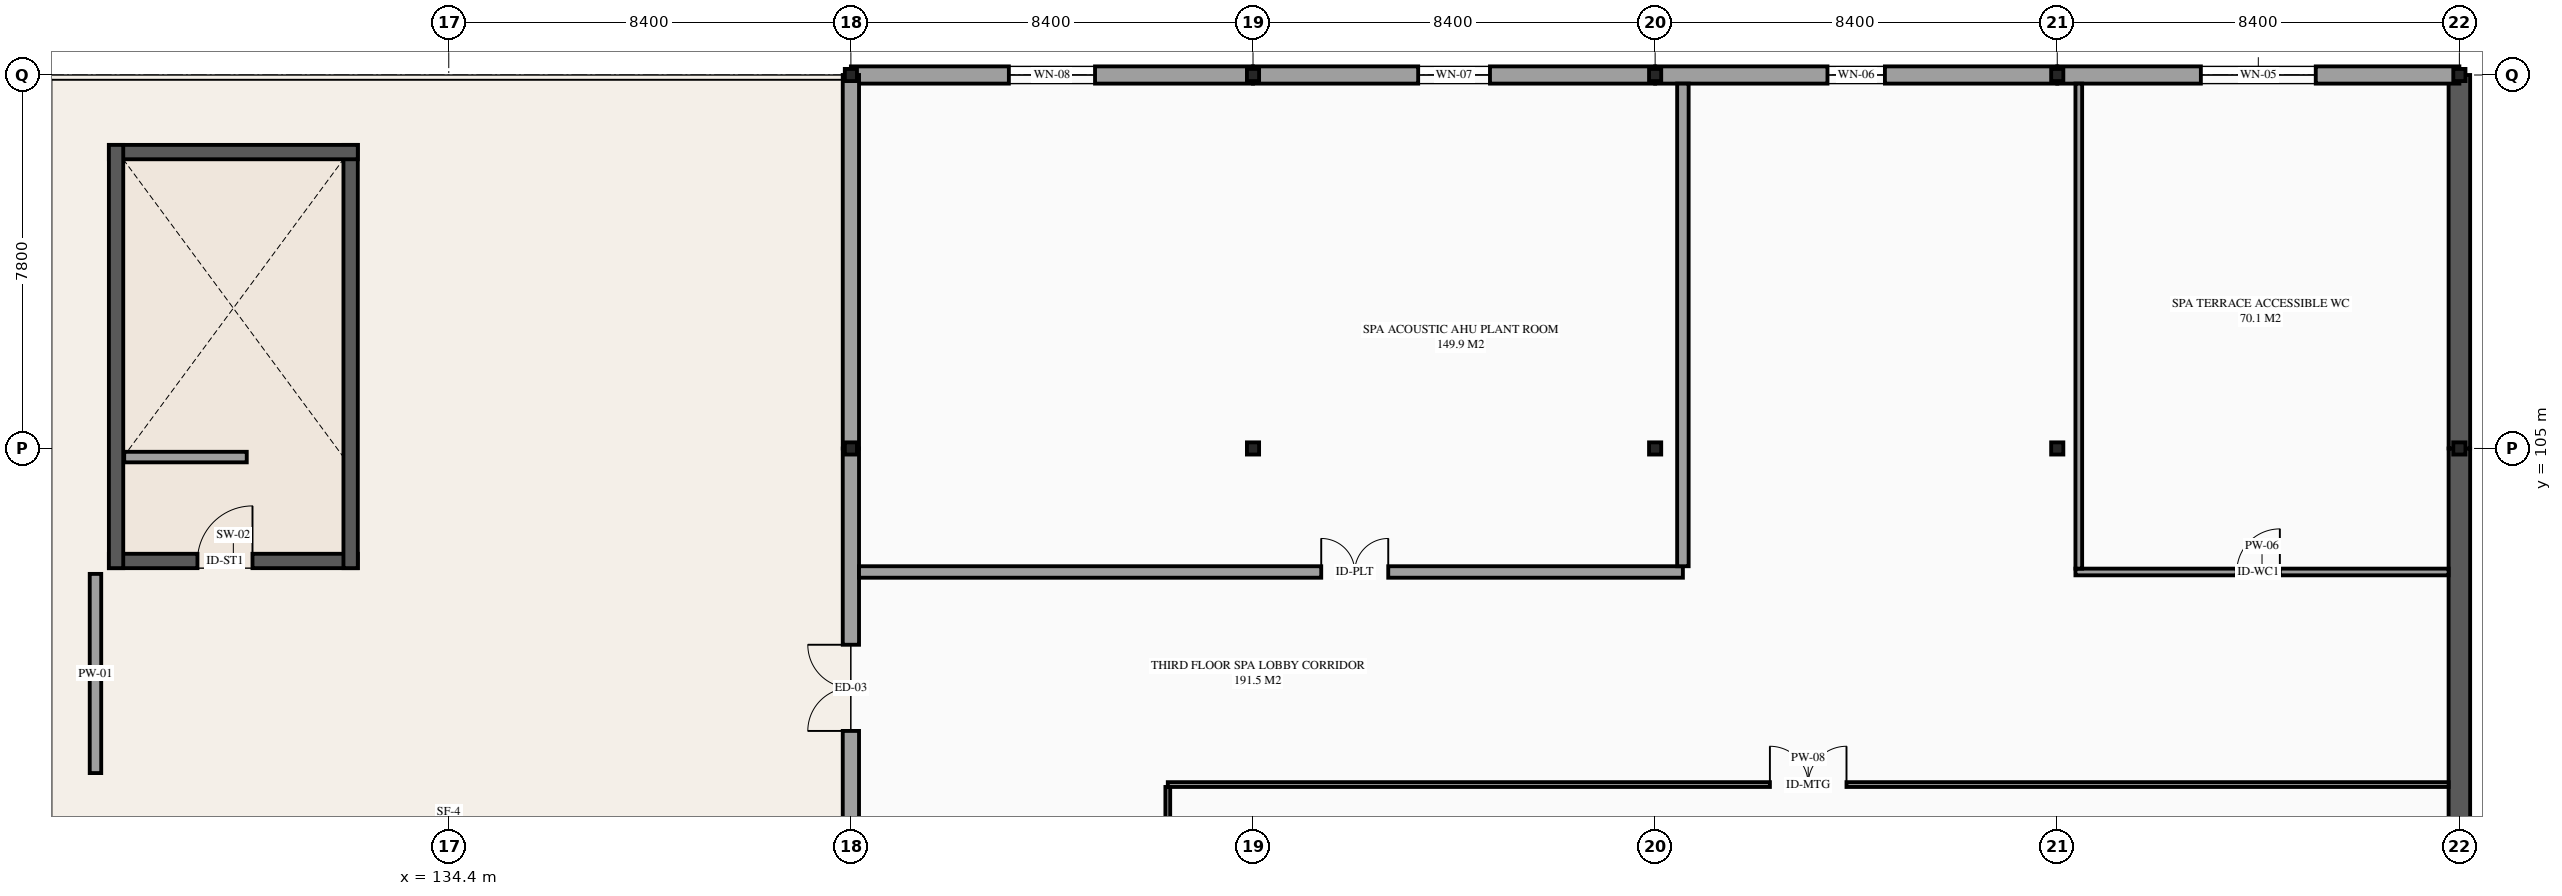
"""IFC4 building model, lengths in metres.
Left out: names, types, materials, properties, quantities, classifications, styles, units other than length and angle.
Written with IfcOpenShell. Run it as: python <this file> out.ifc"""

import sys

from ifc_helpers import new_model, si_unit, direction, frame, frame_2d, origin, origin_2d, place, context, subcontext, project, spatial, rectangle, hollow_rectangle, extrude, element, fill, save


model = new_model("IFC4")
c1 = context("Model", 3, precision=1e-05, world=origin(), true_north=direction((0.0, 1.0)))
c2 = subcontext(c1, "Body", "Model", "MODEL_VIEW")
j1 = project(units=[si_unit("LENGTHUNIT", "METRE"), si_unit("PLANEANGLEUNIT", "RADIAN")], contexts=[c1])
p1 = place(None, origin())
s1 = spatial("IfcSite", under=j1, at=p1, CompositionType="ELEMENT")
p2 = place(p1, origin())
s2 = spatial("IfcBuilding", under=s1, at=p2, CompositionType="ELEMENT")
p3 = place(p2, frame((0.0, 0.0, 14.1)))
s3 = spatial("IfcBuildingStorey", under=s2, at=p3, CompositionType="ELEMENT", Elevation=14.1)
for number, where, z_axis, x_axis in (
    (1, (142.8, 105.0, 0.0), (0.0, 0.0, 1.0), (1.0, 0.0, 0.0)),
    (2, (142.8, 112.8, 0.0), (0.0, 0.0, 1.0), (1.0, 0.0, 0.0)),
    (3, (151.2, 105.0, 0.0), (0.0, 0.0, 1.0), (1.0, 0.0, 0.0)),
    (4, (151.2, 112.8, 0.0), (0.0, 0.0, 1.0), (1.0, 0.0, 0.0)),
    (5, (159.6, 105.0, 0.0), (0.0, 0.0, 1.0), (1.0, 0.0, 0.0)),
    (6, (159.6, 112.8, 0.0), (0.0, 0.0, 1.0), (1.0, 0.0, 0.0)),
    (7, (168.0, 105.0, 0.0), (0.0, 0.0, 1.0), (1.0, 0.0, 0.0)),
    (8, (168.0, 112.8, 0.0), (0.0, 0.0, 1.0), (1.0, 0.0, 0.0)),
    (9, (176.4, 105.0, 0.0), (0.0, 0.0, 1.0), (1.0, 0.0, 0.0)),
    (10, (176.4, 112.8, 0.0), (0.0, 0.0, 1.0), (1.0, 0.0, 0.0)),
):
    element("IfcColumn", number, at=place(p3, frame(where, z_axis=z_axis, x_axis=x_axis)), inside=s3, PredefinedType="COLUMN", context=c2, shape_type="SweptSolid", body=[
        extrude(hollow_rectangle(XDim=0.254, YDim=0.254, WallThickness=0.012, InnerFilletRadius=0.012, OuterFilletRadius=0.024, at=origin_2d()), origin(), (0.0, 0.0, 1.0), 4.2),
    ])
p4 = place(p3, frame((176.4, 96.6, 0.0), z_axis=(0.0, 0.0, 1.0), x_axis=(0.0, 1.0, 0.0)))
e11 = element("IfcWall", 11, at=p4, inside=s3, PredefinedType="STANDARD", context=c2, shape_type="SweptSolid", body=[
    extrude(rectangle(XDim=8.4, YDim=0.45, at=frame_2d((4.2, 0.0))), origin(), (0.0, 0.0, 1.0), 4.2),
])
p5 = place(p3, frame((176.4, 105.0, 0.0), z_axis=(0.0, 0.0, 1.0), x_axis=(0.0, 1.0, 0.0)))
e12 = element("IfcWall", 12, at=p5, inside=s3, PredefinedType="STANDARD", context=c2, shape_type="SweptSolid", body=[
    extrude(rectangle(XDim=7.8, YDim=0.45, at=frame_2d((3.9, 0.0))), origin(), (0.0, 0.0, 1.0), 4.2),
])
p6 = place(p3, frame((176.4, 112.8, 0.0), z_axis=(0.0, 0.0, 1.0), x_axis=(-1.0, 0.0, 0.0)))
e13 = element("IfcWall", 13, at=p6, inside=s3, PredefinedType="STANDARD", context=c2, shape_type="SweptSolid", body=[
    extrude(rectangle(XDim=8.4, YDim=0.36, at=frame_2d((4.2, 0.0))), origin(), (0.0, 0.0, 1.0), 3.05),
])
p7 = place(p6, frame((3.0, 0.0, 0.8)))
e14 = element("IfcOpeningElement", 14, at=p7, cuts=e13, PredefinedType="OPENING", context=c2, shape_type="SweptSolid", body=[
    extrude(rectangle(XDim=2.4, YDim=1.5, at=frame_2d((1.2, 0.75))), frame((0.0, 0.19, 0.0), z_axis=(0.0, -1.0, 0.0), x_axis=(1.0, 0.0, 0.0)), (0.0, 0.0, 1.0), 0.38),
])
p8 = place(p3, frame((168.0, 112.8, 0.0), z_axis=(0.0, 0.0, 1.0), x_axis=(-1.0, 0.0, 0.0)))
e15 = element("IfcWall", 15, at=p8, inside=s3, PredefinedType="STANDARD", context=c2, shape_type="SweptSolid", body=[
    extrude(rectangle(XDim=8.4, YDim=0.36, at=frame_2d((4.2, 0.0))), origin(), (0.0, 0.0, 1.0), 3.4),
])
p9 = place(p8, frame((3.6, 0.0, 0.8)))
e16 = element("IfcOpeningElement", 16, at=p9, cuts=e15, PredefinedType="OPENING", context=c2, shape_type="SweptSolid", body=[
    extrude(rectangle(XDim=1.2, YDim=1.5, at=frame_2d((0.6, 0.75))), frame((0.0, 0.19, 0.0), z_axis=(0.0, -1.0, 0.0), x_axis=(1.0, 0.0, 0.0)), (0.0, 0.0, 1.0), 0.38),
])
p10 = place(p3, frame((159.6, 112.8, 0.0), z_axis=(0.0, 0.0, 1.0), x_axis=(-1.0, 0.0, 0.0)))
e17 = element("IfcWall", 17, at=p10, inside=s3, PredefinedType="STANDARD", context=c2, shape_type="SweptSolid", body=[
    extrude(rectangle(XDim=8.4, YDim=0.36, at=frame_2d((4.2, 0.0))), origin(), (0.0, 0.0, 1.0), 3.3),
])
p11 = place(p10, frame((3.45, 0.0, 0.8)))
e18 = element("IfcOpeningElement", 18, at=p11, cuts=e17, PredefinedType="OPENING", context=c2, shape_type="SweptSolid", body=[
    extrude(rectangle(XDim=1.5, YDim=1.5, at=frame_2d((0.75, 0.75))), frame((0.0, 0.19, 0.0), z_axis=(0.0, -1.0, 0.0), x_axis=(1.0, 0.0, 0.0)), (0.0, 0.0, 1.0), 0.38),
])
p12 = place(p3, frame((151.2, 112.8, 0.0), z_axis=(0.0, 0.0, 1.0), x_axis=(-1.0, 0.0, 0.0)))
e19 = element("IfcWall", 19, at=p12, inside=s3, PredefinedType="STANDARD", context=c2, shape_type="SweptSolid", body=[
    extrude(rectangle(XDim=8.4, YDim=0.36, at=frame_2d((4.2, 0.0))), origin(), (0.0, 0.0, 1.0), 3.2),
])
p13 = place(p12, frame((3.3, 0.0, 0.8)))
e20 = element("IfcOpeningElement", 20, at=p13, cuts=e19, PredefinedType="OPENING", context=c2, shape_type="SweptSolid", body=[
    extrude(rectangle(XDim=1.8, YDim=1.5, at=frame_2d((0.9, 0.75))), frame((0.0, 0.19, 0.0), z_axis=(0.0, -1.0, 0.0), x_axis=(1.0, 0.0, 0.0)), (0.0, 0.0, 1.0), 0.38),
])
p14 = place(p3, frame((142.8, 105.0, 0.0), z_axis=(0.0, 0.0, 1.0), x_axis=(0.0, -1.0, 0.0)))
e21 = element("IfcWall", 21, at=p14, inside=s3, PredefinedType="STANDARD", context=c2, shape_type="SweptSolid", body=[
    extrude(rectangle(XDim=16.8, YDim=0.34, at=frame_2d((8.4, 0.0))), origin(), (0.0, 0.0, 1.0), 3.2),
])
p15 = place(p14, frame((5.9, 0.0, 0.0), z_axis=(0.0, 0.0, 1.0), x_axis=(-1.0, 0.0, 0.0)))
e22 = element("IfcOpeningElement", 22, at=p15, cuts=e21, PredefinedType="OPENING", context=c2, shape_type="SweptSolid", body=[
    extrude(rectangle(XDim=1.8, YDim=2.3, at=frame_2d((0.9, 1.15))), frame((0.0, 0.18, 0.0), z_axis=(0.0, -1.0, 0.0), x_axis=(1.0, 0.0, 0.0)), (0.0, 0.0, 1.0), 0.36),
])
p16 = place(p3, frame((127.3, 102.65, 0.0), z_axis=(0.0, 0.0, 1.0), x_axis=(1.0, 0.0, 0.0)))
e23 = element("IfcWall", 23, at=p16, inside=s3, PredefinedType="SHEAR", context=c2, shape_type="SweptSolid", body=[
    extrude(rectangle(XDim=5.2, YDim=0.3, at=frame_2d((2.6, 0.0))), origin(), (0.0, 0.0, 1.0), 2.65),
])
p17 = place(p16, frame((1.85, 0.0, 0.0)))
e24 = element("IfcOpeningElement", 24, at=p17, cuts=e23, PredefinedType="OPENING", context=c2, shape_type="SweptSolid", body=[
    extrude(rectangle(XDim=1.15, YDim=2.15, at=frame_2d((0.575, 1.075))), frame((0.0, 0.16, 0.0), z_axis=(0.0, -1.0, 0.0), x_axis=(1.0, 0.0, 0.0)), (0.0, 0.0, 1.0), 0.32),
])
p18 = place(p3, frame((132.35, 102.5, 0.0), z_axis=(0.0, 0.0, 1.0), x_axis=(0.0, 1.0, 0.0)))
e25 = element("IfcWall", 25, at=p18, inside=s3, PredefinedType="SHEAR", context=c2, shape_type="SweptSolid", body=[
    extrude(rectangle(XDim=8.84, YDim=0.3, at=frame_2d((4.42, 0.0))), origin(), (0.0, 0.0, 1.0), 2.65),
])
p19 = place(p3, frame((132.5, 111.19, 0.0), z_axis=(0.0, 0.0, 1.0), x_axis=(-1.0, 0.0, 0.0)))
e26 = element("IfcWall", 26, at=p19, inside=s3, PredefinedType="SHEAR", context=c2, shape_type="SweptSolid", body=[
    extrude(rectangle(XDim=5.2, YDim=0.3, at=frame_2d((2.6, 0.0))), origin(), (0.0, 0.0, 1.0), 2.65),
])
p20 = place(p3, frame((127.45, 111.34, 0.0), z_axis=(0.0, 0.0, 1.0), x_axis=(0.0, -1.0, 0.0)))
e27 = element("IfcWall", 27, at=p20, inside=s3, PredefinedType="SHEAR", context=c2, shape_type="SweptSolid", body=[
    extrude(rectangle(XDim=8.84, YDim=0.3, at=frame_2d((4.42, 0.0))), origin(), (0.0, 0.0, 1.0), 2.65),
])
p21 = place(p3, frame((127.62, 104.82, 0.0), z_axis=(0.0, 0.0, 1.0), x_axis=(1.0, 0.0, 0.0)))
e28 = element("IfcWall", 28, at=p21, inside=s3, PredefinedType="PARAPET", context=c2, shape_type="SweptSolid", body=[
    extrude(rectangle(XDim=2.56, YDim=0.22, at=frame_2d((1.28, 0.0))), origin(), (0.0, 0.0, 1.0), 1.14),
])
p22 = place(p3, frame((149.42, 97.98, 0.0), z_axis=(0.0, 0.0, 1.0), x_axis=(1.0, 0.0, 0.0)))
e29 = element("IfcWall", 29, at=p22, inside=s3, PredefinedType="PARTITIONING", context=c2, shape_type="SweptSolid", body=[
    extrude(rectangle(XDim=26.755, YDim=0.1, at=frame_2d((13.377, 0.0))), origin(), (0.0, 0.0, 1.0), 3.895),
])
p23 = place(p22, frame((12.577, 0.0, 0.0)))
e30 = element("IfcOpeningElement", 30, at=p23, cuts=e29, PredefinedType="OPENING", context=c2, shape_type="SweptSolid", body=[
    extrude(rectangle(XDim=1.6, YDim=2.25, at=frame_2d((0.8, 1.125))), frame((0.0, 0.06, 0.0), z_axis=(0.0, -1.0, 0.0), x_axis=(1.0, 0.0, 0.0)), (0.0, 0.0, 1.0), 0.12),
])
p24 = place(p3, frame((149.42, 79.97, 0.0), z_axis=(0.0, 0.0, 1.0), x_axis=(0.0, 1.0, 0.0)))
e31 = element("IfcWall", 31, at=p24, inside=s3, PredefinedType="PARTITIONING", context=c2, shape_type="SweptSolid", body=[
    extrude(rectangle(XDim=17.96, YDim=0.1, at=frame_2d((8.98, 0.0))), origin(), (0.0, 0.0, 1.0), 3.895),
])
p25 = place(p3, frame((127.02, 98.22, 0.0), z_axis=(0.0, 0.0, 1.0), x_axis=(0.0, 1.0, 0.0)))
e32 = element("IfcWall", 32, at=p25, inside=s3, PredefinedType="PARTITIONING", context=c2, shape_type="SweptSolid", body=[
    extrude(rectangle(XDim=4.16, YDim=0.24, at=frame_2d((2.08, 0.0))), origin(), (0.0, 0.0, 1.0), 3.895),
])
p26 = place(p3, frame((142.97, 102.42, 0.0), z_axis=(0.0, 0.0, 1.0), x_axis=(1.0, 0.0, 0.0)))
e33 = element("IfcWall", 33, at=p26, inside=s3, PredefinedType="PARTITIONING", context=c2, shape_type="SweptSolid", body=[
    extrude(rectangle(XDim=17.21, YDim=0.24, at=frame_2d((8.605, 0.0))), origin(), (0.0, 0.0, 1.0), 3.895),
])
p27 = place(p26, frame((9.655, 0.0, 0.0)))
e34 = element("IfcOpeningElement", 34, at=p27, cuts=e33, PredefinedType="OPENING", context=c2, shape_type="SweptSolid", body=[
    extrude(rectangle(XDim=1.4, YDim=2.2, at=frame_2d((0.7, 1.1))), frame((0.0, 0.13, 0.0), z_axis=(0.0, -1.0, 0.0), x_axis=(1.0, 0.0, 0.0)), (0.0, 0.0, 1.0), 0.26),
])
p28 = place(p3, frame((160.18, 102.54, 0.0), z_axis=(0.0, 0.0, 1.0), x_axis=(0.0, 1.0, 0.0)))
e35 = element("IfcWall", 35, at=p28, inside=s3, PredefinedType="PARTITIONING", context=c2, shape_type="SweptSolid", body=[
    extrude(rectangle(XDim=10.08, YDim=0.24, at=frame_2d((5.04, 0.0))), origin(), (0.0, 0.0, 1.0), 3.895),
])
p29 = place(p3, frame((168.38, 102.42, 0.0), z_axis=(0.0, 0.0, 1.0), x_axis=(1.0, 0.0, 0.0)))
e36 = element("IfcWall", 36, at=p29, inside=s3, PredefinedType="PARTITIONING", context=c2, shape_type="SweptSolid", body=[
    extrude(rectangle(XDim=7.795, YDim=0.14, at=frame_2d((3.897, 0.0))), origin(), (0.0, 0.0, 1.0), 3.895),
])
p30 = place(p29, frame((3.37, 0.0, 0.0)))
e37 = element("IfcOpeningElement", 37, at=p30, cuts=e36, PredefinedType="OPENING", context=c2, shape_type="SweptSolid", body=[
    extrude(rectangle(XDim=0.9, YDim=2.12, at=frame_2d((0.45, 1.06))), frame((0.0, 0.08, 0.0), z_axis=(0.0, -1.0, 0.0), x_axis=(1.0, 0.0, 0.0)), (0.0, 0.0, 1.0), 0.16),
])
p31 = place(p3, frame((168.45, 102.49, 0.0), z_axis=(0.0, 0.0, 1.0), x_axis=(0.0, 1.0, 0.0)))
e38 = element("IfcWall", 38, at=p31, inside=s3, PredefinedType="PARTITIONING", context=c2, shape_type="SweptSolid", body=[
    extrude(rectangle(XDim=10.13, YDim=0.14, at=frame_2d((5.065, 0.0))), origin(), (0.0, 0.0, 1.0), 3.895),
])
p32 = place(p3, frame((142.8, 112.8, 0.0), z_axis=(0.0, 0.0, 1.0), x_axis=(0.0, -1.0, 0.0)))
e39 = element("IfcWall", 39, at=p32, inside=s3, PredefinedType="STANDARD", context=c2, shape_type="SweptSolid", body=[
    extrude(rectangle(XDim=7.8, YDim=0.34, at=frame_2d((3.9, 0.0))), origin(), (0.0, 0.0, 1.0), 3.3),
])
p33 = place(p7, origin())
e40 = element("IfcWindow", 40, at=p33, inside=s3, PartitioningType="SINGLE_PANEL", PredefinedType="WINDOW", context=c2, shape_type="SweptSolid", body=[
    extrude(rectangle(XDim=2.4, YDim=1.5, at=frame_2d((1.2, 0.75))), frame((0.0, 0.03, 0.0), z_axis=(0.0, -1.0, 0.0), x_axis=(1.0, 0.0, 0.0)), (0.0, 0.0, 1.0), 0.06),
])
fill(e14, e40)
p34 = place(p9, origin())
e41 = element("IfcWindow", 41, at=p34, inside=s3, PartitioningType="SINGLE_PANEL", PredefinedType="WINDOW", context=c2, shape_type="SweptSolid", body=[
    extrude(rectangle(XDim=1.2, YDim=1.5, at=frame_2d((0.6, 0.75))), frame((0.0, 0.03, 0.0), z_axis=(0.0, -1.0, 0.0), x_axis=(1.0, 0.0, 0.0)), (0.0, 0.0, 1.0), 0.06),
])
fill(e16, e41)
p35 = place(p11, origin())
e42 = element("IfcWindow", 42, at=p35, inside=s3, PartitioningType="SINGLE_PANEL", PredefinedType="WINDOW", context=c2, shape_type="SweptSolid", body=[
    extrude(rectangle(XDim=1.5, YDim=1.5, at=frame_2d((0.75, 0.75))), frame((0.0, 0.03, 0.0), z_axis=(0.0, -1.0, 0.0), x_axis=(1.0, 0.0, 0.0)), (0.0, 0.0, 1.0), 0.06),
])
fill(e18, e42)
p36 = place(p13, origin())
e43 = element("IfcWindow", 43, at=p36, inside=s3, PartitioningType="SINGLE_PANEL", PredefinedType="WINDOW", context=c2, shape_type="SweptSolid", body=[
    extrude(rectangle(XDim=1.8, YDim=1.5, at=frame_2d((0.9, 0.75))), frame((0.0, 0.03, 0.0), z_axis=(0.0, -1.0, 0.0), x_axis=(1.0, 0.0, 0.0)), (0.0, 0.0, 1.0), 0.06),
])
fill(e20, e43)
p37 = place(p15, origin())
e44 = element("IfcDoor", 44, at=p37, inside=s3, OperationType="DOUBLE_DOOR_SINGLE_SWING", PredefinedType="DOOR", context=c2, shape_type="SweptSolid", body=[
    extrude(rectangle(XDim=1.8, YDim=2.3, at=frame_2d((0.9, 1.15))), frame((0.0, 0.025, 0.0), z_axis=(0.0, -1.0, 0.0), x_axis=(1.0, 0.0, 0.0)), (0.0, 0.0, 1.0), 0.05),
])
fill(e22, e44)
p38 = place(p17, origin())
e45 = element("IfcDoor", 45, at=p38, inside=s3, OperationType="SINGLE_SWING_RIGHT", PredefinedType="DOOR", context=c2, shape_type="SweptSolid", body=[
    extrude(rectangle(XDim=1.15, YDim=2.15, at=frame_2d((0.575, 1.075))), frame((0.0, 0.025, 0.0), z_axis=(0.0, -1.0, 0.0), x_axis=(1.0, 0.0, 0.0)), (0.0, 0.0, 1.0), 0.05),
])
fill(e24, e45)
p39 = place(p23, origin())
e46 = element("IfcDoor", 46, at=p39, inside=s3, OperationType="DOUBLE_DOOR_SINGLE_SWING", PredefinedType="DOOR", context=c2, shape_type="SweptSolid", body=[
    extrude(rectangle(XDim=1.6, YDim=2.25, at=frame_2d((0.8, 1.125))), frame((0.0, 0.025, 0.0), z_axis=(0.0, -1.0, 0.0), x_axis=(1.0, 0.0, 0.0)), (0.0, 0.0, 1.0), 0.05),
])
fill(e30, e46)
p40 = place(p27, origin())
e47 = element("IfcDoor", 47, at=p40, inside=s3, OperationType="DOUBLE_DOOR_SINGLE_SWING", PredefinedType="DOOR", context=c2, shape_type="SweptSolid", body=[
    extrude(rectangle(XDim=1.4, YDim=2.2, at=frame_2d((0.7, 1.1))), frame((0.0, 0.025, 0.0), z_axis=(0.0, -1.0, 0.0), x_axis=(1.0, 0.0, 0.0)), (0.0, 0.0, 1.0), 0.05),
])
fill(e34, e47)
p41 = place(p30, origin())
e48 = element("IfcDoor", 48, at=p41, inside=s3, OperationType="SINGLE_SWING_RIGHT", PredefinedType="DOOR", context=c2, shape_type="SweptSolid", body=[
    extrude(rectangle(XDim=0.9, YDim=2.12, at=frame_2d((0.45, 1.06))), frame((0.0, 0.025, 0.0), z_axis=(0.0, -1.0, 0.0), x_axis=(1.0, 0.0, 0.0)), (0.0, 0.0, 1.0), 0.05),
])
fill(e37, e48)
save(model, sys.argv[1])
